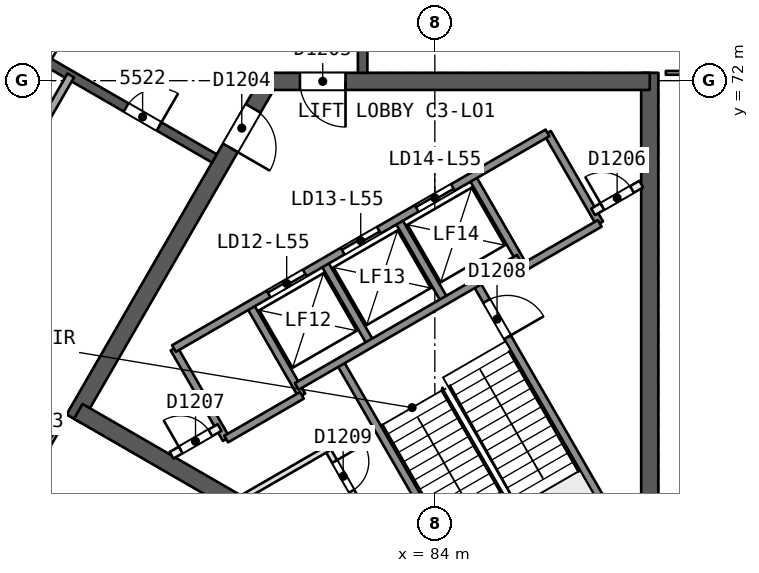
"""IFC4 building model, lengths in metres.
Left out: names, types, materials, properties, quantities, classifications, styles, units other than length and angle.
Written with IfcOpenShell. Run it as: python <this file> out.ifc"""

import sys

from ifc_helpers import new_model, si_unit, direction, frame, frame_2d, origin, place, context, subcontext, project, spatial, rectangle, extrude, element, fill, save


model = new_model("IFC4")
c1 = context("Model", 3, precision=1e-05, world=origin(), true_north=direction((0.0, 1.0)))
c2 = subcontext(c1, "Body", "Model", "MODEL_VIEW")
j1 = project(units=[si_unit("LENGTHUNIT", "METRE"), si_unit("PLANEANGLEUNIT", "RADIAN")], contexts=[c1])
p1 = place(None, origin())
s1 = spatial("IfcSite", under=j1, at=p1, CompositionType="ELEMENT")
p2 = place(p1, origin())
s2 = spatial("IfcBuilding", under=s1, at=p2, CompositionType="ELEMENT")
p3 = place(p2, frame((0.0, 0.0, 224.3)))
s3 = spatial("IfcBuildingStorey", under=s2, at=p3, CompositionType="ELEMENT", Elevation=224.3)
p4 = place(p3, frame((79.63, 71.981, 0.0), z_axis=(0.0, 0.0, 1.0), x_axis=(-0.500002171595, -0.86602415001, 0.0)))
e1 = element("IfcWall", 1, at=p4, inside=s3, PredefinedType="SHEAR", context=c2, shape_type="SweptSolid", body=[
    extrude(rectangle(XDim=10.25, YDim=0.45, at=frame_2d((5.125, 0.0))), origin(), (0.0, 0.0, 1.0), 3.7),
])
p5 = place(p4, frame((0.82, 0.0, 0.0)))
e2 = element("IfcOpeningElement", 2, at=p5, cuts=e1, PredefinedType="OPENING", context=c2, shape_type="SweptSolid", body=[
    extrude(rectangle(XDim=1.2, YDim=2.1, at=frame_2d((0.6, 1.05))), frame((0.0, 0.235, 0.0), z_axis=(0.0, -1.0, 0.0), x_axis=(1.0, 0.0, 0.0)), (0.0, 0.0, 1.0), 0.471),
])
p6 = place(p3, frame((74.617, 63.299, 0.0), z_axis=(0.0, 0.0, 1.0), x_axis=(0.86602594008, -0.499999071108, 0.0)))
e3 = element("IfcWall", 3, at=p6, inside=s3, PredefinedType="SHEAR", context=c2, shape_type="SweptSolid", body=[
    extrude(rectangle(XDim=14.108, YDim=0.45, at=frame_2d((7.054, 0.0))), origin(), (0.0, 0.0, 1.0), 3.7),
])
p7 = place(p3, frame((89.655, 58.002, 0.0), z_axis=(0.0, 0.0, 1.0), x_axis=(0.0, 1.0, 0.0)))
e4 = element("IfcWall", 4, at=p7, inside=s3, PredefinedType="SHEAR", context=c2, shape_type="SweptSolid", body=[
    extrude(rectangle(XDim=14.204, YDim=0.45, at=frame_2d((7.102, 0.0))), origin(), (0.0, 0.0, 1.0), 3.7),
])
p8 = place(p3, frame((89.655, 71.981, 0.0), z_axis=(0.0, 0.0, 1.0), x_axis=(-1.0, 0.0, 0.0)))
e5 = element("IfcWall", 5, at=p8, inside=s3, PredefinedType="SHEAR", context=c2, shape_type="SweptSolid", body=[
    extrude(rectangle(XDim=10.155, YDim=0.45, at=frame_2d((5.078, 0.0))), origin(), (0.0, 0.0, 1.0), 3.7),
])
p9 = place(p8, frame((8.005, 0.0, 0.0)))
e6 = element("IfcOpeningElement", 6, at=p9, cuts=e5, PredefinedType="OPENING", context=c2, shape_type="SweptSolid", body=[
    extrude(rectangle(XDim=1.2, YDim=2.1, at=frame_2d((0.6, 1.05))), frame((0.0, 0.235, 0.0), z_axis=(0.0, -1.0, 0.0), x_axis=(1.0, 0.0, 0.0)), (0.0, 0.0, 1.0), 0.471),
])
p10 = place(p3, frame((82.1, 72.206, 0.0), z_axis=(0.0, 0.0, 1.0), x_axis=(0.0, 1.0, 0.0)))
e7 = element("IfcWall", 7, at=p10, inside=s3, PredefinedType="SHEAR", context=c2, shape_type="SweptSolid", body=[
    extrude(rectangle(XDim=15.588, YDim=0.25, at=frame_2d((7.794, 0.0))), origin(), (0.0, 0.0, 1.0), 3.3),
])
p11 = place(p10, frame((2.15, 0.0, 0.0)))
e8 = element("IfcOpeningElement", 8, at=p11, cuts=e7, PredefinedType="OPENING", context=c2, shape_type="SweptSolid", body=[
    extrude(rectangle(XDim=1.0, YDim=2.1, at=frame_2d((0.5, 1.05))), frame((0.0, 0.135, 0.0), z_axis=(0.0, -1.0, 0.0), x_axis=(1.0, 0.0, 0.0)), (0.0, 0.0, 1.0), 0.271),
])
p12 = place(p10, frame((8.75, 0.0, 0.0)))
e9 = element("IfcOpeningElement", 9, at=p12, cuts=e7, PredefinedType="OPENING", context=c2, shape_type="SweptSolid", body=[
    extrude(rectangle(XDim=1.0, YDim=2.1, at=frame_2d((0.5, 1.05))), frame((0.0, 0.135, 0.0), z_axis=(0.0, -1.0, 0.0), x_axis=(1.0, 0.0, 0.0)), (0.0, 0.0, 1.0), 0.271),
])
p13 = place(p10, frame((12.594, 0.0, 0.0)))
e10 = element("IfcOpeningElement", 10, at=p13, cuts=e7, PredefinedType="OPENING", context=c2, shape_type="SweptSolid", body=[
    extrude(rectangle(XDim=1.0, YDim=2.1, at=frame_2d((0.5, 1.05))), frame((0.0, 0.135, 0.0), z_axis=(0.0, -1.0, 0.0), x_axis=(1.0, 0.0, 0.0)), (0.0, 0.0, 1.0), 0.271),
])
p14 = place(p3, frame((64.7, 77.748, 0.0), z_axis=(0.0, 0.0, 1.0), x_axis=(0.866026492143, -0.499998114903, 0.0)))
e11 = element("IfcWall", 11, at=p14, inside=s3, PredefinedType="SHEAR", context=c2, shape_type="SweptSolid", body=[
    extrude(rectangle(XDim=15.588, YDim=0.25, at=frame_2d((7.794, 0.0))), origin(), (0.0, 0.0, 1.0), 3.3),
])
p15 = place(p14, frame((2.462, 0.0, 0.0)))
e12 = element("IfcOpeningElement", 12, at=p15, cuts=e11, PredefinedType="OPENING", context=c2, shape_type="SweptSolid", body=[
    extrude(rectangle(XDim=1.0, YDim=2.1, at=frame_2d((0.5, 1.05))), frame((0.0, 0.135, 0.0), z_axis=(0.0, -1.0, 0.0), x_axis=(1.0, 0.0, 0.0)), (0.0, 0.0, 1.0), 0.271),
])
p16 = place(p14, frame((9.474, 0.0, 0.0)))
e13 = element("IfcOpeningElement", 13, at=p16, cuts=e11, PredefinedType="OPENING", context=c2, shape_type="SweptSolid", body=[
    extrude(rectangle(XDim=1.1, YDim=2.1, at=frame_2d((0.55, 1.05))), frame((0.0, 0.135, 0.0), z_axis=(0.0, -1.0, 0.0), x_axis=(1.0, 0.0, 0.0)), (0.0, 0.0, 1.0), 0.271),
])
p17 = place(p14, frame((12.906, 0.0, 0.0)))
e14 = element("IfcOpeningElement", 14, at=p17, cuts=e11, PredefinedType="OPENING", context=c2, shape_type="SweptSolid", body=[
    extrude(rectangle(XDim=1.0, YDim=2.1, at=frame_2d((0.5, 1.05))), frame((0.0, 0.135, 0.0), z_axis=(0.0, -1.0, 0.0), x_axis=(1.0, 0.0, 0.0)), (0.0, 0.0, 1.0), 0.271),
])
p18 = place(p3, frame((90.079, 72.206, 0.0), z_axis=(0.0, 0.0, 1.0), x_axis=(1.0, 0.0, 0.0)))
e15 = element("IfcWall", 15, at=p18, inside=s3, PredefinedType="PARTITIONING", context=c2, shape_type="SweptSolid", body=[
    extrude(rectangle(XDim=2.349, YDim=0.1, at=frame_2d((1.175, 0.0))), origin(), (0.0, 0.0, 1.0), 3.3),
])
p19 = place(p18, frame((0.725, 0.0, 0.0)))
e16 = element("IfcOpeningElement", 16, at=p19, cuts=e15, PredefinedType="OPENING", context=c2, shape_type="SweptSolid", body=[
    extrude(rectangle(XDim=0.9, YDim=2.1, at=frame_2d((0.45, 1.05))), frame((0.0, 0.061, 0.0), z_axis=(0.0, -1.0, 0.0), x_axis=(1.0, 0.0, 0.0)), (0.0, 0.0, 1.0), 0.121),
])
p20 = place(p3, frame((69.256, 63.192, 0.0), z_axis=(0.0, 0.0, 1.0), x_axis=(0.499993230995, 0.866029311836, 0.0)))
e17 = element("IfcWall", 17, at=p20, inside=s3, PredefinedType="PARTITIONING", context=c2, shape_type="SweptSolid", body=[
    extrude(rectangle(XDim=10.328, YDim=0.2, at=frame_2d((5.164, 0.0))), origin(), (0.0, 0.0, 1.0), 3.3),
])
p21 = place(p3, frame((73.036, 61.01, 0.0), z_axis=(0.0, 0.0, 1.0), x_axis=(0.499950341091, 0.86605407247, 0.0)))
e18 = element("IfcWall", 18, at=p21, inside=s3, PredefinedType="PARTITIONING", context=c2, shape_type="SweptSolid", body=[
    extrude(rectangle(XDim=2.349, YDim=0.1, at=frame_2d((1.175, 0.0))), origin(), (0.0, 0.0, 1.0), 3.3),
])
p22 = place(p21, frame((0.725, 0.0, 0.0)))
e19 = element("IfcOpeningElement", 19, at=p22, cuts=e18, PredefinedType="OPENING", context=c2, shape_type="SweptSolid", body=[
    extrude(rectangle(XDim=0.9, YDim=2.1, at=frame_2d((0.45, 1.05))), frame((0.0, 0.061, 0.0), z_axis=(0.0, -1.0, 0.0), x_axis=(1.0, 0.0, 0.0)), (0.0, 0.0, 1.0), 0.121),
])
p23 = place(p3, frame((88.099, 52.141, 0.0), z_axis=(0.0, 0.0, 1.0), x_axis=(-0.86602584856, 0.499999229625, 0.0)))
e20 = element("IfcWall", 20, at=p23, inside=s3, PredefinedType="SOLIDWALL", context=c2, shape_type="SweptSolid", body=[
    extrude(rectangle(XDim=50.547, YDim=0.3, at=frame_2d((25.274, 0.0))), origin(), (0.0, 0.0, 1.0), 3.3),
])
p24 = place(p23, frame((23.294, 0.0, 0.0)))
e21 = element("IfcOpeningElement", 21, at=p24, cuts=e20, PredefinedType="OPENING", context=c2, shape_type="SweptSolid", body=[
    extrude(rectangle(XDim=2.4, YDim=2.4, at=frame_2d((1.2, 1.2))), frame((0.0, 0.161, 0.0), z_axis=(0.0, -1.0, 0.0), x_axis=(1.0, 0.0, 0.0)), (0.0, 0.0, 1.0), 0.321),
])
p25 = place(p23, frame((28.906, 0.0, 0.0)))
e22 = element("IfcOpeningElement", 22, at=p25, cuts=e20, PredefinedType="OPENING", context=c2, shape_type="SweptSolid", body=[
    extrude(rectangle(XDim=2.4, YDim=2.4, at=frame_2d((1.2, 1.2))), frame((0.0, 0.161, 0.0), z_axis=(0.0, -1.0, 0.0), x_axis=(1.0, 0.0, 0.0)), (0.0, 0.0, 1.0), 0.321),
])
p26 = place(p23, frame((39.328, 0.0, 0.0)))
e23 = element("IfcOpeningElement", 23, at=p26, cuts=e20, PredefinedType="OPENING", context=c2, shape_type="SweptSolid", body=[
    extrude(rectangle(XDim=2.4, YDim=2.4, at=frame_2d((1.2, 1.2))), frame((0.0, 0.161, 0.0), z_axis=(0.0, -1.0, 0.0), x_axis=(1.0, 0.0, 0.0)), (0.0, 0.0, 1.0), 0.321),
])
p27 = place(p23, frame((18.462, 0.0, 0.0)))
e24 = element("IfcOpeningElement", 24, at=p27, cuts=e20, PredefinedType="OPENING", context=c2, shape_type="SweptSolid", body=[
    extrude(rectangle(XDim=2.4, YDim=2.4, at=frame_2d((1.2, 1.2))), frame((0.0, 0.161, 0.0), z_axis=(0.0, -1.0, 0.0), x_axis=(1.0, 0.0, 0.0)), (0.0, 0.0, 1.0), 0.321),
])
p28 = place(p23, frame((8.771, 0.0, 0.0)))
e25 = element("IfcOpeningElement", 25, at=p28, cuts=e20, PredefinedType="OPENING", context=c2, shape_type="SweptSolid", body=[
    extrude(rectangle(XDim=2.4, YDim=2.4, at=frame_2d((1.2, 1.2))), frame((0.0, 0.161, 0.0), z_axis=(0.0, -1.0, 0.0), x_axis=(1.0, 0.0, 0.0)), (0.0, 0.0, 1.0), 0.321),
])
p29 = place(p3, frame((77.135, 64.952, 0.0), z_axis=(0.0, 0.0, 1.0), x_axis=(0.499996545922, -0.866027397988, 0.0)))
e26 = element("IfcWall", 26, at=p29, inside=s3, PredefinedType="SOLIDWALL", context=c2, shape_type="SweptSolid", body=[
    extrude(rectangle(XDim=2.75, YDim=0.2, at=frame_2d((1.375, 0.0))), origin(), (0.0, 0.0, 1.0), 3.3),
])
p30 = place(p3, frame((81.169, 62.315, 0.0), z_axis=(0.0, 0.0, 1.0), x_axis=(0.499995408039, -0.866028054938, 0.0)))
e27 = element("IfcWall", 27, at=p30, inside=s3, PredefinedType="PARTITIONING", context=c2, shape_type="SweptSolid", body=[
    extrude(rectangle(XDim=1.6, YDim=0.15, at=frame_2d((0.8, 0.0))), origin(), (0.0, 0.0, 1.0), 3.3),
])
p31 = place(p30, frame((0.387, 0.0, 0.0)))
e28 = element("IfcOpeningElement", 28, at=p31, cuts=e27, PredefinedType="OPENING", context=c2, shape_type="SweptSolid", body=[
    extrude(rectangle(XDim=0.9, YDim=2.1, at=frame_2d((0.45, 1.05))), frame((0.0, 0.085, 0.0), z_axis=(0.0, -1.0, 0.0), x_axis=(1.0, 0.0, 0.0)), (0.0, 0.0, 1.0), 0.171),
])
p32 = place(p3, frame((79.127, 66.102, 0.0), z_axis=(0.0, 0.0, 1.0), x_axis=(0.499996545922, -0.866027397988, 0.0)))
e29 = element("IfcWall", 29, at=p32, inside=s3, PredefinedType="SOLIDWALL", context=c2, shape_type="SweptSolid", body=[
    extrude(rectangle(XDim=2.75, YDim=0.2, at=frame_2d((1.375, 0.0))), origin(), (0.0, 0.0, 1.0), 3.3),
])
p33 = place(p3, frame((81.493, 64.604, 0.0), z_axis=(0.0, 0.0, 1.0), x_axis=(0.500006057782, -0.866021906294, 0.0)))
e30 = element("IfcWall", 30, at=p33, inside=s3, PredefinedType="SOLIDWALL", context=c2, shape_type="SweptSolid", body=[
    extrude(rectangle(XDim=7.7, YDim=0.2, at=frame_2d((3.85, 0.0))), origin(), (0.0, 0.0, 1.0), 3.3),
])
for number, where, z_axis, x_axis in (
    (31, (81.076, 67.227, 0.0), (0.0, 0.0, 1.0), (0.5, -0.866, 0.0)),
    (32, (83.024, 68.352, 0.0), (0.0, 0.0, 1.0), (0.5, -0.866, 0.0)),
):
    element("IfcWall", number, at=place(p3, frame(where, z_axis=z_axis, x_axis=x_axis)), inside=s3, PredefinedType="SOLIDWALL", context=c2, shape_type="SweptSolid", body=[
        extrude(rectangle(XDim=2.48, YDim=0.2, at=frame_2d((1.24, 0.0))), origin(), (0.0, 0.0, 1.0), 3.3),
    ])
p34 = place(p3, frame((85.087, 66.679, 0.0), z_axis=(0.0, 0.0, 1.0), x_axis=(0.500019787375, -0.866013979237, 0.0)))
e33 = element("IfcWall", 33, at=p34, inside=s3, PredefinedType="SOLIDWALL", context=c2, shape_type="SweptSolid", body=[
    extrude(rectangle(XDim=7.7, YDim=0.2, at=frame_2d((3.85, 0.0))), origin(), (0.0, 0.0, 1.0), 3.3),
])
p35 = place(p34, frame((0.55, 0.0, 0.0)))
e34 = element("IfcOpeningElement", 34, at=p35, cuts=e33, PredefinedType="OPENING", context=c2, shape_type="SweptSolid", body=[
    extrude(rectangle(XDim=1.1, YDim=2.1, at=frame_2d((0.55, 1.05))), frame((0.0, 0.11, 0.0), z_axis=(0.0, -1.0, 0.0), x_axis=(1.0, 0.0, 0.0)), (0.0, 0.0, 1.0), 0.221),
])
for number, where, z_axis, x_axis in (
    (35, (84.973, 69.477, 0.0), (0.0, 0.0, 1.0), (0.5, -0.866, 0.0)),
    (36, (86.965, 70.626, 0.0), (0.0, 0.0, 1.0), (0.5, -0.866, 0.0)),
):
    element("IfcWall", number, at=place(p3, frame(where, z_axis=z_axis, x_axis=x_axis)), inside=s3, PredefinedType="SOLIDWALL", context=c2, shape_type="SweptSolid", body=[
        extrude(rectangle(XDim=2.75, YDim=0.2, at=frame_2d((1.375, 0.0))), origin(), (0.0, 0.0, 1.0), 3.3),
    ])
p36 = place(p3, frame((77.135, 64.952, 0.0), z_axis=(0.0, 0.0, 1.0), x_axis=(0.866031916153, 0.499988720078, 0.0)))
e37 = element("IfcWall", 37, at=p36, inside=s3, PredefinedType="SOLIDWALL", context=c2, shape_type="SweptSolid", body=[
    extrude(rectangle(XDim=11.35, YDim=0.2, at=frame_2d((5.675, 0.0))), origin(), (0.0, 0.0, 1.0), 3.3),
])
p37 = place(p36, frame((2.875, 0.0, 0.0)))
e38 = element("IfcOpeningElement", 38, at=p37, cuts=e37, PredefinedType="OPENING", context=c2, shape_type="SweptSolid", body=[
    extrude(rectangle(XDim=1.1, YDim=2.1, at=frame_2d((0.55, 1.05))), frame((0.0, 0.11, 0.0), z_axis=(0.0, -1.0, 0.0), x_axis=(1.0, 0.0, 0.0)), (0.0, 0.0, 1.0), 0.221),
])
p38 = place(p36, frame((5.125, 0.0, 0.0)))
e39 = element("IfcOpeningElement", 39, at=p38, cuts=e37, PredefinedType="OPENING", context=c2, shape_type="SweptSolid", body=[
    extrude(rectangle(XDim=1.1, YDim=2.1, at=frame_2d((0.55, 1.05))), frame((0.0, 0.11, 0.0), z_axis=(0.0, -1.0, 0.0), x_axis=(1.0, 0.0, 0.0)), (0.0, 0.0, 1.0), 0.221),
])
p39 = place(p36, frame((7.375, 0.0, 0.0)))
e40 = element("IfcOpeningElement", 40, at=p39, cuts=e37, PredefinedType="OPENING", context=c2, shape_type="SweptSolid", body=[
    extrude(rectangle(XDim=1.1, YDim=2.1, at=frame_2d((0.55, 1.05))), frame((0.0, 0.11, 0.0), z_axis=(0.0, -1.0, 0.0), x_axis=(1.0, 0.0, 0.0)), (0.0, 0.0, 1.0), 0.221),
])
p40 = place(p3, frame((77.07, 62.143, 0.0), z_axis=(0.0, 0.0, 1.0), x_axis=(0.866013036001, 0.500021421018, 0.0)))
e41 = element("IfcWall", 41, at=p40, inside=s3, PredefinedType="PARTITIONING", context=c2, shape_type="SweptSolid", body=[
    extrude(rectangle(XDim=1.461, YDim=0.2, at=frame_2d((0.73, 0.0))), origin(), (0.0, 0.0, 1.0), 3.3),
])
p41 = place(p40, frame((0.281, 0.0, 0.0)))
e42 = element("IfcOpeningElement", 42, at=p41, cuts=e41, PredefinedType="OPENING", context=c2, shape_type="SweptSolid", body=[
    extrude(rectangle(XDim=0.9, YDim=2.1, at=frame_2d((0.45, 1.05))), frame((0.0, 0.11, 0.0), z_axis=(0.0, -1.0, 0.0), x_axis=(1.0, 0.0, 0.0)), (0.0, 0.0, 1.0), 0.221),
])
p42 = place(p3, frame((88.165, 68.548, 0.0), z_axis=(0.0, 0.0, 1.0), x_axis=(0.866013036001, 0.500021421018, 0.0)))
e43 = element("IfcWall", 43, at=p42, inside=s3, PredefinedType="PARTITIONING", context=c2, shape_type="SweptSolid", body=[
    extrude(rectangle(XDim=1.461, YDim=0.2, at=frame_2d((0.73, 0.0))), origin(), (0.0, 0.0, 1.0), 3.3),
])
p43 = place(p42, frame((0.281, 0.0, 0.0)))
e44 = element("IfcOpeningElement", 44, at=p43, cuts=e43, PredefinedType="OPENING", context=c2, shape_type="SweptSolid", body=[
    extrude(rectangle(XDim=0.9, YDim=2.1, at=frame_2d((0.45, 1.05))), frame((0.0, 0.11, 0.0), z_axis=(0.0, -1.0, 0.0), x_axis=(1.0, 0.0, 0.0)), (0.0, 0.0, 1.0), 0.221),
])
p44 = place(p3, frame((80.367, 63.954, 0.0), z_axis=(0.0, 0.0, 1.0), x_axis=(0.866026575979, 0.499997969693, 0.0)))
e45 = element("IfcWall", 45, at=p44, inside=s3, PredefinedType="SOLIDWALL", context=c2, shape_type="SweptSolid", body=[
    extrude(rectangle(XDim=6.75, YDim=0.2, at=frame_2d((3.375, 0.0))), origin(), (0.0, 0.0, 1.0), 3.3),
])
p45 = place(p3, frame((78.51, 62.57, 0.0), z_axis=(0.0, 0.0, 1.0), x_axis=(0.866053019151, 0.499952165731, 0.0)))
e46 = element("IfcWall", 46, at=p45, inside=s3, PredefinedType="SOLIDWALL", context=c2, shape_type="SweptSolid", body=[
    extrude(rectangle(XDim=2.3, YDim=0.2, at=frame_2d((1.15, 0.0))), origin(), (0.0, 0.0, 1.0), 3.3),
])
p46 = place(p3, frame((86.348, 67.095, 0.0), z_axis=(0.0, 0.0, 1.0), x_axis=(0.86602648383, 0.499998129301, 0.0)))
e47 = element("IfcWall", 47, at=p46, inside=s3, PredefinedType="SOLIDWALL", context=c2, shape_type="SweptSolid", body=[
    extrude(rectangle(XDim=2.3, YDim=0.2, at=frame_2d((1.15, 0.0))), origin(), (0.0, 0.0, 1.0), 3.3),
])
p47 = place(p3, frame((78.97, 61.046, 0.0), z_axis=(0.0, 0.0, 1.0), x_axis=(0.866033475577, 0.499986018985, 0.0)))
e48 = element("IfcWall", 48, at=p47, inside=s3, PredefinedType="PARTITIONING", context=c2, shape_type="SweptSolid", body=[
    extrude(rectangle(XDim=2.539, YDim=0.15, at=frame_2d((1.27, 0.0))), origin(), (0.0, 0.0, 1.0), 3.3),
])
p48 = place(p17, origin())
e49 = element("IfcDoor", 49, at=p48, inside=s3, OperationType="SINGLE_SWING_RIGHT", PredefinedType="NOTDEFINED", context=c2, shape_type="SweptSolid", body=[
    extrude(rectangle(XDim=1.0, YDim=2.1, at=frame_2d((0.5, 1.05))), frame((0.0, 0.025, 0.0), z_axis=(0.0, -1.0, 0.0), x_axis=(1.0, 0.0, 0.0)), (0.0, 0.0, 1.0), 0.05),
])
fill(e14, e49)
p49 = place(p5, origin())
e50 = element("IfcDoor", 50, at=p49, inside=s3, OperationType="SINGLE_SWING_RIGHT", PredefinedType="NOTDEFINED", context=c2, shape_type="SweptSolid", body=[
    extrude(rectangle(XDim=1.2, YDim=2.1, at=frame_2d((0.6, 1.05))), frame((0.0, 0.025, 0.0), z_axis=(0.0, -1.0, 0.0), x_axis=(1.0, 0.0, 0.0)), (0.0, 0.0, 1.0), 0.05),
])
fill(e2, e50)
p50 = place(p9, origin())
e51 = element("IfcDoor", 51, at=p50, inside=s3, OperationType="SINGLE_SWING_LEFT", PredefinedType="NOTDEFINED", context=c2, shape_type="SweptSolid", body=[
    extrude(rectangle(XDim=1.2, YDim=2.1, at=frame_2d((0.6, 1.05))), frame((0.0, 0.025, 0.0), z_axis=(0.0, -1.0, 0.0), x_axis=(1.0, 0.0, 0.0)), (0.0, 0.0, 1.0), 0.05),
])
fill(e6, e51)
p51 = place(p37, origin())
e52 = element("IfcDoor", 52, at=p51, inside=s3, OperationType="SLIDING_TO_LEFT", PredefinedType="NOTDEFINED", context=c2, shape_type="SweptSolid", body=[
    extrude(rectangle(XDim=1.1, YDim=2.1, at=frame_2d((0.55, 1.05))), frame((0.0, 0.025, 0.0), z_axis=(0.0, -1.0, 0.0), x_axis=(1.0, 0.0, 0.0)), (0.0, 0.0, 1.0), 0.05),
])
fill(e38, e52)
p52 = place(p38, origin())
e53 = element("IfcDoor", 53, at=p52, inside=s3, OperationType="SLIDING_TO_RIGHT", PredefinedType="NOTDEFINED", context=c2, shape_type="SweptSolid", body=[
    extrude(rectangle(XDim=1.1, YDim=2.1, at=frame_2d((0.55, 1.05))), frame((0.0, 0.025, 0.0), z_axis=(0.0, -1.0, 0.0), x_axis=(1.0, 0.0, 0.0)), (0.0, 0.0, 1.0), 0.05),
])
fill(e39, e53)
p53 = place(p39, origin())
e54 = element("IfcDoor", 54, at=p53, inside=s3, OperationType="SLIDING_TO_LEFT", PredefinedType="NOTDEFINED", context=c2, shape_type="SweptSolid", body=[
    extrude(rectangle(XDim=1.1, YDim=2.1, at=frame_2d((0.55, 1.05))), frame((0.0, 0.025, 0.0), z_axis=(0.0, -1.0, 0.0), x_axis=(1.0, 0.0, 0.0)), (0.0, 0.0, 1.0), 0.05),
])
fill(e40, e54)
p54 = place(p43, origin())
e55 = element("IfcDoor", 55, at=p54, inside=s3, OperationType="SINGLE_SWING_LEFT", PredefinedType="NOTDEFINED", context=c2, shape_type="SweptSolid", body=[
    extrude(rectangle(XDim=0.9, YDim=2.1, at=frame_2d((0.45, 1.05))), frame((0.0, 0.025, 0.0), z_axis=(0.0, -1.0, 0.0), x_axis=(1.0, 0.0, 0.0)), (0.0, 0.0, 1.0), 0.05),
])
fill(e44, e55)
p55 = place(p41, origin())
e56 = element("IfcDoor", 56, at=p55, inside=s3, OperationType="SINGLE_SWING_LEFT", PredefinedType="NOTDEFINED", context=c2, shape_type="SweptSolid", body=[
    extrude(rectangle(XDim=0.9, YDim=2.1, at=frame_2d((0.45, 1.05))), frame((0.0, 0.025, 0.0), z_axis=(0.0, -1.0, 0.0), x_axis=(1.0, 0.0, 0.0)), (0.0, 0.0, 1.0), 0.05),
])
fill(e42, e56)
p56 = place(p35, origin())
e57 = element("IfcDoor", 57, at=p56, inside=s3, OperationType="SINGLE_SWING_RIGHT", PredefinedType="NOTDEFINED", context=c2, shape_type="SweptSolid", body=[
    extrude(rectangle(XDim=1.1, YDim=2.1, at=frame_2d((0.55, 1.05))), frame((0.0, 0.025, 0.0), z_axis=(0.0, -1.0, 0.0), x_axis=(1.0, 0.0, 0.0)), (0.0, 0.0, 1.0), 0.05),
])
fill(e34, e57)
p57 = place(p31, origin())
e58 = element("IfcDoor", 58, at=p57, inside=s3, OperationType="SINGLE_SWING_LEFT", PredefinedType="NOTDEFINED", context=c2, shape_type="SweptSolid", body=[
    extrude(rectangle(XDim=0.9, YDim=2.1, at=frame_2d((0.45, 1.05))), frame((0.0, 0.025, 0.0), z_axis=(0.0, -1.0, 0.0), x_axis=(1.0, 0.0, 0.0)), (0.0, 0.0, 1.0), 0.05),
])
fill(e28, e58)
save(model, sys.argv[1])
